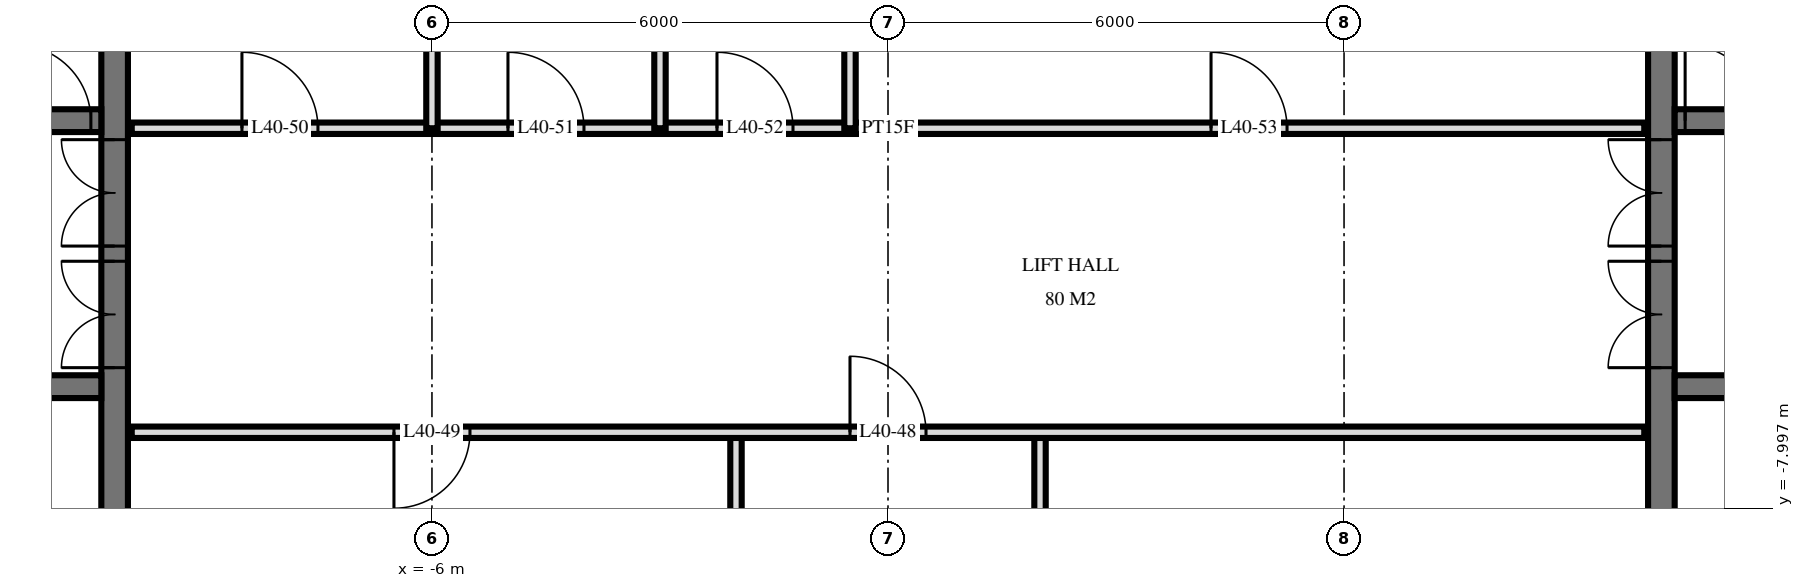
"""IFC4 building model, lengths in metres.
Left out: names, types, materials, properties, quantities, classifications, styles, units other than length and angle.
Written with IfcOpenShell. Run it as: python <this file> out.ifc"""

import sys

from ifc_helpers import new_model, si_unit, direction, frame, frame_2d, origin, place, context, subcontext, project, spatial, rectangle, extrude, element, fill, save


model = new_model("IFC4")
c1 = context("Model", 3, precision=1e-05, world=origin(), true_north=direction((0.0, 1.0)))
c2 = subcontext(c1, "Body", "Model", "MODEL_VIEW")
j1 = project(units=[si_unit("LENGTHUNIT", "METRE"), si_unit("PLANEANGLEUNIT", "RADIAN")], contexts=[c1])
p1 = place(None, origin())
s1 = spatial("IfcSite", under=j1, at=p1, CompositionType="ELEMENT")
p2 = place(p1, origin())
s2 = spatial("IfcBuilding", under=s1, at=p2, CompositionType="ELEMENT")
p3 = place(p2, frame((0.0, 0.0, 156.0)))
s3 = spatial("IfcBuildingStorey", under=s2, at=p3, CompositionType="ELEMENT", Elevation=156.0)
p4 = place(p3, frame((-10.175, -14.55, 0.0), z_axis=(0.0, 0.0, 1.0), x_axis=(0.0, 1.0, 0.0)))
e1 = element("IfcWall", 1, at=p4, inside=s3, PredefinedType="SHEAR", context=c2, shape_type="SweptSolid", body=[
    extrude(rectangle(XDim=14.1, YDim=0.35, at=frame_2d((7.05, 0.0))), origin(), (0.0, 0.0, 1.0), 3.6),
])
p5 = place(p4, frame((8.4, 0.0, 0.0)))
e2 = element("IfcOpeningElement", 2, at=p5, cuts=e1, PredefinedType="OPENING", context=c2, shape_type="SweptSolid", body=[
    extrude(rectangle(XDim=1.4, YDim=2.4, at=frame_2d((0.7, 1.2))), frame((0.0, 0.185, 0.0), z_axis=(0.0, -1.0, 0.0), x_axis=(1.0, 0.0, 0.0)), (0.0, 0.0, 1.0), 0.37),
])
p6 = place(p4, frame((10.0, 0.0, 0.0)))
e3 = element("IfcOpeningElement", 3, at=p6, cuts=e1, PredefinedType="OPENING", context=c2, shape_type="SweptSolid", body=[
    extrude(rectangle(XDim=1.4, YDim=2.4, at=frame_2d((0.7, 1.2))), frame((0.0, 0.185, 0.0), z_axis=(0.0, -1.0, 0.0), x_axis=(1.0, 0.0, 0.0)), (0.0, 0.0, 1.0), 0.37),
])
p7 = place(p4, frame((4.0, 0.0, 0.0)))
e4 = element("IfcOpeningElement", 4, at=p7, cuts=e1, PredefinedType="OPENING", context=c2, shape_type="SweptSolid", body=[
    extrude(rectangle(XDim=1.2, YDim=2.1, at=frame_2d((0.6, 1.05))), frame((0.0, 0.185, 0.0), z_axis=(0.0, -1.0, 0.0), x_axis=(1.0, 0.0, 0.0)), (0.0, 0.0, 1.0), 0.37),
])
p8 = place(p3, frame((-24.05, -2.9, 0.0), z_axis=(0.0, 0.0, 1.0), x_axis=(1.0, 0.0, 0.0)))
e5 = element("IfcWall", 5, at=p8, inside=s3, PredefinedType="SHEAR", context=c2, shape_type="SweptSolid", body=[
    extrude(rectangle(XDim=13.7, YDim=0.3, at=frame_2d((6.85, 0.0))), origin(), (0.0, 0.0, 1.0), 3.6),
])
p9 = place(p8, frame((0.55, 0.0, 0.0)))
e6 = element("IfcOpeningElement", 6, at=p9, cuts=e5, PredefinedType="OPENING", context=c2, shape_type="SweptSolid", body=[
    extrude(rectangle(XDim=1.1, YDim=2.1, at=frame_2d((0.55, 1.05))), frame((0.0, 0.16, 0.0), z_axis=(0.0, -1.0, 0.0), x_axis=(1.0, 0.0, 0.0)), (0.0, 0.0, 1.0), 0.32),
])
p10 = place(p8, frame((6.613, 0.0, 0.0)))
e7 = element("IfcOpeningElement", 7, at=p10, cuts=e5, PredefinedType="OPENING", context=c2, shape_type="SweptSolid", body=[
    extrude(rectangle(XDim=0.9, YDim=2.1, at=frame_2d((0.45, 1.05))), frame((0.0, 0.16, 0.0), z_axis=(0.0, -1.0, 0.0), x_axis=(1.0, 0.0, 0.0)), (0.0, 0.0, 1.0), 0.32),
])
p11 = place(p8, frame((5.188, 0.0, 0.0)))
e8 = element("IfcOpeningElement", 8, at=p11, cuts=e5, PredefinedType="OPENING", context=c2, shape_type="SweptSolid", body=[
    extrude(rectangle(XDim=0.9, YDim=2.1, at=frame_2d((0.45, 1.05))), frame((0.0, 0.16, 0.0), z_axis=(0.0, -1.0, 0.0), x_axis=(1.0, 0.0, 0.0)), (0.0, 0.0, 1.0), 0.32),
])
p12 = place(p8, frame((12.562, 0.0, 0.0)))
e9 = element("IfcOpeningElement", 9, at=p12, cuts=e5, PredefinedType="OPENING", context=c2, shape_type="SweptSolid", body=[
    extrude(rectangle(XDim=1.0, YDim=2.1, at=frame_2d((0.5, 1.05))), frame((0.0, 0.16, 0.0), z_axis=(0.0, -1.0, 0.0), x_axis=(1.0, 0.0, 0.0)), (0.0, 0.0, 1.0), 0.32),
])
p13 = place(p8, frame((11.137, 0.0, 0.0)))
e10 = element("IfcOpeningElement", 10, at=p13, cuts=e5, PredefinedType="OPENING", context=c2, shape_type="SweptSolid", body=[
    extrude(rectangle(XDim=1.0, YDim=2.1, at=frame_2d((0.5, 1.05))), frame((0.0, 0.16, 0.0), z_axis=(0.0, -1.0, 0.0), x_axis=(1.0, 0.0, 0.0)), (0.0, 0.0, 1.0), 0.32),
])
p14 = place(p8, frame((8.85, 0.0, 0.0)))
e11 = element("IfcOpeningElement", 11, at=p14, cuts=e5, PredefinedType="OPENING", context=c2, shape_type="SweptSolid", body=[
    extrude(rectangle(XDim=1.0, YDim=2.1, at=frame_2d((0.5, 1.05))), frame((0.0, 0.16, 0.0), z_axis=(0.0, -1.0, 0.0), x_axis=(1.0, 0.0, 0.0)), (0.0, 0.0, 1.0), 0.32),
])
p15 = place(p8, frame((3.0, 0.0, 0.0)))
e12 = element("IfcOpeningElement", 12, at=p15, cuts=e5, PredefinedType="OPENING", context=c2, shape_type="SweptSolid", body=[
    extrude(rectangle(XDim=1.0, YDim=2.1, at=frame_2d((0.5, 1.05))), frame((0.0, 0.16, 0.0), z_axis=(0.0, -1.0, 0.0), x_axis=(1.0, 0.0, 0.0)), (0.0, 0.0, 1.0), 0.32),
])
p16 = place(p3, frame((-24.05, -6.4, 0.0), z_axis=(0.0, 0.0, 1.0), x_axis=(1.0, 0.0, 0.0)))
e13 = element("IfcWall", 13, at=p16, inside=s3, PredefinedType="SHEAR", context=c2, shape_type="SweptSolid", body=[
    extrude(rectangle(XDim=13.7, YDim=0.3, at=frame_2d((6.85, 0.0))), origin(), (0.0, 0.0, 1.0), 3.6),
])
p17 = place(p16, frame((0.55, 0.0, 0.0)))
e14 = element("IfcOpeningElement", 14, at=p17, cuts=e13, PredefinedType="OPENING", context=c2, shape_type="SweptSolid", body=[
    extrude(rectangle(XDim=1.1, YDim=2.1, at=frame_2d((0.55, 1.05))), frame((0.0, 0.16, 0.0), z_axis=(0.0, -1.0, 0.0), x_axis=(1.0, 0.0, 0.0)), (0.0, 0.0, 1.0), 0.32),
])
p18 = place(p16, frame((5.8, 0.0, 0.0)))
e15 = element("IfcOpeningElement", 15, at=p18, cuts=e13, PredefinedType="OPENING", context=c2, shape_type="SweptSolid", body=[
    extrude(rectangle(XDim=1.1, YDim=2.1, at=frame_2d((0.55, 1.05))), frame((0.0, 0.16, 0.0), z_axis=(0.0, -1.0, 0.0), x_axis=(1.0, 0.0, 0.0)), (0.0, 0.0, 1.0), 0.32),
])
p19 = place(p3, frame((10.175, -14.55, 0.0), z_axis=(0.0, 0.0, 1.0), x_axis=(0.0, 1.0, 0.0)))
e16 = element("IfcWall", 16, at=p19, inside=s3, PredefinedType="SHEAR", context=c2, shape_type="SweptSolid", body=[
    extrude(rectangle(XDim=14.1, YDim=0.35, at=frame_2d((7.05, 0.0))), origin(), (0.0, 0.0, 1.0), 3.6),
])
p20 = place(p19, frame((8.4, 0.0, 0.0)))
e17 = element("IfcOpeningElement", 17, at=p20, cuts=e16, PredefinedType="OPENING", context=c2, shape_type="SweptSolid", body=[
    extrude(rectangle(XDim=1.4, YDim=2.4, at=frame_2d((0.7, 1.2))), frame((0.0, 0.185, 0.0), z_axis=(0.0, -1.0, 0.0), x_axis=(1.0, 0.0, 0.0)), (0.0, 0.0, 1.0), 0.37),
])
p21 = place(p19, frame((10.0, 0.0, 0.0)))
e18 = element("IfcOpeningElement", 18, at=p21, cuts=e16, PredefinedType="OPENING", context=c2, shape_type="SweptSolid", body=[
    extrude(rectangle(XDim=1.4, YDim=2.4, at=frame_2d((0.7, 1.2))), frame((0.0, 0.185, 0.0), z_axis=(0.0, -1.0, 0.0), x_axis=(1.0, 0.0, 0.0)), (0.0, 0.0, 1.0), 0.37),
])
p22 = place(p19, frame((4.0, 0.0, 0.0)))
e19 = element("IfcOpeningElement", 19, at=p22, cuts=e16, PredefinedType="OPENING", context=c2, shape_type="SweptSolid", body=[
    extrude(rectangle(XDim=1.2, YDim=2.1, at=frame_2d((0.6, 1.05))), frame((0.0, 0.185, 0.0), z_axis=(0.0, -1.0, 0.0), x_axis=(1.0, 0.0, 0.0)), (0.0, 0.0, 1.0), 0.37),
])
p23 = place(p3, frame((10.35, -2.9, 0.0), z_axis=(0.0, 0.0, 1.0), x_axis=(1.0, 0.0, 0.0)))
e20 = element("IfcWall", 20, at=p23, inside=s3, PredefinedType="SHEAR", context=c2, shape_type="SweptSolid", body=[
    extrude(rectangle(XDim=13.7, YDim=0.3, at=frame_2d((6.85, 0.0))), origin(), (0.0, 0.0, 1.0), 3.6),
])
p24 = place(p23, frame((12.05, 0.0, 0.0)))
e21 = element("IfcOpeningElement", 21, at=p24, cuts=e20, PredefinedType="OPENING", context=c2, shape_type="SweptSolid", body=[
    extrude(rectangle(XDim=1.1, YDim=2.1, at=frame_2d((0.55, 1.05))), frame((0.0, 0.16, 0.0), z_axis=(0.0, -1.0, 0.0), x_axis=(1.0, 0.0, 0.0)), (0.0, 0.0, 1.0), 0.32),
])
p25 = place(p23, frame((6.188, 0.0, 0.0)))
e22 = element("IfcOpeningElement", 22, at=p25, cuts=e20, PredefinedType="OPENING", context=c2, shape_type="SweptSolid", body=[
    extrude(rectangle(XDim=0.9, YDim=2.1, at=frame_2d((0.45, 1.05))), frame((0.0, 0.16, 0.0), z_axis=(0.0, -1.0, 0.0), x_axis=(1.0, 0.0, 0.0)), (0.0, 0.0, 1.0), 0.32),
])
p26 = place(p23, frame((7.613, 0.0, 0.0)))
e23 = element("IfcOpeningElement", 23, at=p26, cuts=e20, PredefinedType="OPENING", context=c2, shape_type="SweptSolid", body=[
    extrude(rectangle(XDim=0.9, YDim=2.1, at=frame_2d((0.45, 1.05))), frame((0.0, 0.16, 0.0), z_axis=(0.0, -1.0, 0.0), x_axis=(1.0, 0.0, 0.0)), (0.0, 0.0, 1.0), 0.32),
])
p27 = place(p23, frame((0.137, 0.0, 0.0)))
e24 = element("IfcOpeningElement", 24, at=p27, cuts=e20, PredefinedType="OPENING", context=c2, shape_type="SweptSolid", body=[
    extrude(rectangle(XDim=1.0, YDim=2.1, at=frame_2d((0.5, 1.05))), frame((0.0, 0.16, 0.0), z_axis=(0.0, -1.0, 0.0), x_axis=(1.0, 0.0, 0.0)), (0.0, 0.0, 1.0), 0.32),
])
p28 = place(p23, frame((1.562, 0.0, 0.0)))
e25 = element("IfcOpeningElement", 25, at=p28, cuts=e20, PredefinedType="OPENING", context=c2, shape_type="SweptSolid", body=[
    extrude(rectangle(XDim=1.0, YDim=2.1, at=frame_2d((0.5, 1.05))), frame((0.0, 0.16, 0.0), z_axis=(0.0, -1.0, 0.0), x_axis=(1.0, 0.0, 0.0)), (0.0, 0.0, 1.0), 0.32),
])
p29 = place(p23, frame((3.85, 0.0, 0.0)))
e26 = element("IfcOpeningElement", 26, at=p29, cuts=e20, PredefinedType="OPENING", context=c2, shape_type="SweptSolid", body=[
    extrude(rectangle(XDim=1.0, YDim=2.1, at=frame_2d((0.5, 1.05))), frame((0.0, 0.16, 0.0), z_axis=(0.0, -1.0, 0.0), x_axis=(1.0, 0.0, 0.0)), (0.0, 0.0, 1.0), 0.32),
])
p30 = place(p23, frame((9.7, 0.0, 0.0)))
e27 = element("IfcOpeningElement", 27, at=p30, cuts=e20, PredefinedType="OPENING", context=c2, shape_type="SweptSolid", body=[
    extrude(rectangle(XDim=1.0, YDim=2.1, at=frame_2d((0.5, 1.05))), frame((0.0, 0.16, 0.0), z_axis=(0.0, -1.0, 0.0), x_axis=(1.0, 0.0, 0.0)), (0.0, 0.0, 1.0), 0.32),
])
p31 = place(p3, frame((10.35, -6.4, 0.0), z_axis=(0.0, 0.0, 1.0), x_axis=(1.0, 0.0, 0.0)))
e28 = element("IfcWall", 28, at=p31, inside=s3, PredefinedType="SHEAR", context=c2, shape_type="SweptSolid", body=[
    extrude(rectangle(XDim=13.7, YDim=0.3, at=frame_2d((6.85, 0.0))), origin(), (0.0, 0.0, 1.0), 3.6),
])
p32 = place(p31, frame((12.05, 0.0, 0.0)))
e29 = element("IfcOpeningElement", 29, at=p32, cuts=e28, PredefinedType="OPENING", context=c2, shape_type="SweptSolid", body=[
    extrude(rectangle(XDim=1.1, YDim=2.1, at=frame_2d((0.55, 1.05))), frame((0.0, 0.16, 0.0), z_axis=(0.0, -1.0, 0.0), x_axis=(1.0, 0.0, 0.0)), (0.0, 0.0, 1.0), 0.32),
])
p33 = place(p31, frame((6.8, 0.0, 0.0)))
e30 = element("IfcOpeningElement", 30, at=p33, cuts=e28, PredefinedType="OPENING", context=c2, shape_type="SweptSolid", body=[
    extrude(rectangle(XDim=1.1, YDim=2.1, at=frame_2d((0.55, 1.05))), frame((0.0, 0.16, 0.0), z_axis=(0.0, -1.0, 0.0), x_axis=(1.0, 0.0, 0.0)), (0.0, 0.0, 1.0), 0.32),
])
p34 = place(p3, frame((2.0, -11.0, 0.0), z_axis=(0.0, 0.0, 1.0), x_axis=(0.0, 1.0, 0.0)))
e31 = element("IfcWall", 31, at=p34, inside=s3, PredefinedType="PARTITIONING", context=c2, shape_type="SweptSolid", body=[
    extrude(rectangle(XDim=4.0, YDim=0.15, at=frame_2d((2.0, 0.0))), origin(), (0.0, 0.0, 1.0), 3.32),
])
p35 = place(p3, frame((-0.5, -3.0, 0.0), z_axis=(0.0, 0.0, 1.0), x_axis=(0.0, 1.0, 0.0)))
e32 = element("IfcWall", 32, at=p35, inside=s3, PredefinedType="PLUMBINGWALL", context=c2, shape_type="SweptSolid", body=[
    extrude(rectangle(XDim=4.02, YDim=0.15, at=frame_2d((2.01, 0.0))), origin(), (0.0, 0.0, 1.0), 3.32),
])
p36 = place(p3, frame((-2.0, -11.0, 0.0), z_axis=(0.0, 0.0, 1.0), x_axis=(0.0, 1.0, 0.0)))
e33 = element("IfcWall", 33, at=p36, inside=s3, PredefinedType="PARTITIONING", context=c2, shape_type="SweptSolid", body=[
    extrude(rectangle(XDim=4.0, YDim=0.15, at=frame_2d((2.0, 0.0))), origin(), (0.0, 0.0, 1.0), 3.32),
])
for number, where, z_axis, x_axis in (
    (34, (-3.0, -3.0, 0.0), (0.0, 0.0, 1.0), (0.0, 1.0, 0.0)),
    (35, (-6.0, -3.0, 0.0), (0.0, 0.0, 1.0), (0.0, 1.0, 0.0)),
):
    element("IfcWall", number, at=place(p3, frame(where, z_axis=z_axis, x_axis=x_axis)), inside=s3, PredefinedType="PLUMBINGWALL", context=c2, shape_type="SweptSolid", body=[
        extrude(rectangle(XDim=4.02, YDim=0.15, at=frame_2d((2.01, 0.0))), origin(), (0.0, 0.0, 1.0), 3.32),
    ])
p37 = place(p3, frame((-9.95, -7.0, 0.0), z_axis=(0.0, 0.0, 1.0), x_axis=(1.0, 0.0, 0.0)))
e36 = element("IfcWall", 36, at=p37, inside=s3, PredefinedType="PARTITIONING", context=c2, shape_type="SweptSolid", body=[
    extrude(rectangle(XDim=19.9, YDim=0.15, at=frame_2d((9.95, 0.0))), origin(), (0.0, 0.0, 1.0), 3.32),
])
p38 = place(p37, frame((9.45, 0.0, 0.0)))
e37 = element("IfcOpeningElement", 37, at=p38, cuts=e36, PredefinedType="OPENING", context=c2, shape_type="SweptSolid", body=[
    extrude(rectangle(XDim=1.0, YDim=2.1, at=frame_2d((0.5, 1.05))), frame((0.0, 0.085, 0.0), z_axis=(0.0, -1.0, 0.0), x_axis=(1.0, 0.0, 0.0)), (0.0, 0.0, 1.0), 0.17),
])
p39 = place(p37, frame((3.45, 0.0, 0.0)))
e38 = element("IfcOpeningElement", 38, at=p39, cuts=e36, PredefinedType="OPENING", context=c2, shape_type="SweptSolid", body=[
    extrude(rectangle(XDim=1.0, YDim=2.1, at=frame_2d((0.5, 1.05))), frame((0.0, 0.085, 0.0), z_axis=(0.0, -1.0, 0.0), x_axis=(1.0, 0.0, 0.0)), (0.0, 0.0, 1.0), 0.17),
])
p40 = place(p3, frame((-9.95, -3.0, 0.0), z_axis=(0.0, 0.0, 1.0), x_axis=(1.0, 0.0, 0.0)))
e39 = element("IfcWall", 39, at=p40, inside=s3, PredefinedType="PARTITIONING", context=c2, shape_type="SweptSolid", body=[
    extrude(rectangle(XDim=19.9, YDim=0.15, at=frame_2d((9.95, 0.0))), origin(), (0.0, 0.0, 1.0), 3.32),
])
p41 = place(p40, frame((1.45, 0.0, 0.0)))
e40 = element("IfcOpeningElement", 40, at=p41, cuts=e39, PredefinedType="OPENING", context=c2, shape_type="SweptSolid", body=[
    extrude(rectangle(XDim=1.0, YDim=2.1, at=frame_2d((0.5, 1.05))), frame((0.0, 0.085, 0.0), z_axis=(0.0, -1.0, 0.0), x_axis=(1.0, 0.0, 0.0)), (0.0, 0.0, 1.0), 0.17),
])
p42 = place(p40, frame((4.95, 0.0, 0.0)))
e41 = element("IfcOpeningElement", 41, at=p42, cuts=e39, PredefinedType="OPENING", context=c2, shape_type="SweptSolid", body=[
    extrude(rectangle(XDim=1.0, YDim=2.1, at=frame_2d((0.5, 1.05))), frame((0.0, 0.085, 0.0), z_axis=(0.0, -1.0, 0.0), x_axis=(1.0, 0.0, 0.0)), (0.0, 0.0, 1.0), 0.17),
])
p43 = place(p40, frame((7.7, 0.0, 0.0)))
e42 = element("IfcOpeningElement", 42, at=p43, cuts=e39, PredefinedType="OPENING", context=c2, shape_type="SweptSolid", body=[
    extrude(rectangle(XDim=1.0, YDim=2.1, at=frame_2d((0.5, 1.05))), frame((0.0, 0.085, 0.0), z_axis=(0.0, -1.0, 0.0), x_axis=(1.0, 0.0, 0.0)), (0.0, 0.0, 1.0), 0.17),
])
p44 = place(p40, frame((14.2, 0.0, 0.0)))
e43 = element("IfcOpeningElement", 43, at=p44, cuts=e39, PredefinedType="OPENING", context=c2, shape_type="SweptSolid", body=[
    extrude(rectangle(XDim=1.0, YDim=2.1, at=frame_2d((0.5, 1.05))), frame((0.0, 0.085, 0.0), z_axis=(0.0, -1.0, 0.0), x_axis=(1.0, 0.0, 0.0)), (0.0, 0.0, 1.0), 0.17),
])
p45 = place(p5, origin())
e44 = element("IfcDoor", 44, at=p45, inside=s3, OperationType="DOUBLE_DOOR_SINGLE_SWING", PredefinedType="DOOR", context=c2, shape_type="SweptSolid", body=[
    extrude(rectangle(XDim=1.4, YDim=2.4, at=frame_2d((0.7, 1.2))), frame((0.0, 0.025, 0.0), z_axis=(0.0, -1.0, 0.0), x_axis=(1.0, 0.0, 0.0)), (0.0, 0.0, 1.0), 0.05),
])
fill(e2, e44)
p46 = place(p6, origin())
e45 = element("IfcDoor", 45, at=p46, inside=s3, OperationType="DOUBLE_DOOR_SINGLE_SWING", PredefinedType="DOOR", context=c2, shape_type="SweptSolid", body=[
    extrude(rectangle(XDim=1.4, YDim=2.4, at=frame_2d((0.7, 1.2))), frame((0.0, 0.025, 0.0), z_axis=(0.0, -1.0, 0.0), x_axis=(1.0, 0.0, 0.0)), (0.0, 0.0, 1.0), 0.05),
])
fill(e3, e45)
p47 = place(p12, origin())
e46 = element("IfcDoor", 46, at=p47, inside=s3, OperationType="SINGLE_SWING_RIGHT", PredefinedType="DOOR", context=c2, shape_type="SweptSolid", body=[
    extrude(rectangle(XDim=1.0, YDim=2.1, at=frame_2d((0.5, 1.05))), frame((0.0, 0.025, 0.0), z_axis=(0.0, -1.0, 0.0), x_axis=(1.0, 0.0, 0.0)), (0.0, 0.0, 1.0), 0.05),
])
fill(e9, e46)
p48 = place(p20, origin())
e47 = element("IfcDoor", 47, at=p48, inside=s3, OperationType="DOUBLE_DOOR_SINGLE_SWING", PredefinedType="DOOR", context=c2, shape_type="SweptSolid", body=[
    extrude(rectangle(XDim=1.4, YDim=2.4, at=frame_2d((0.7, 1.2))), frame((0.0, 0.025, 0.0), z_axis=(0.0, -1.0, 0.0), x_axis=(1.0, 0.0, 0.0)), (0.0, 0.0, 1.0), 0.05),
])
fill(e17, e47)
p49 = place(p21, origin())
e48 = element("IfcDoor", 48, at=p49, inside=s3, OperationType="DOUBLE_DOOR_SINGLE_SWING", PredefinedType="DOOR", context=c2, shape_type="SweptSolid", body=[
    extrude(rectangle(XDim=1.4, YDim=2.4, at=frame_2d((0.7, 1.2))), frame((0.0, 0.025, 0.0), z_axis=(0.0, -1.0, 0.0), x_axis=(1.0, 0.0, 0.0)), (0.0, 0.0, 1.0), 0.05),
])
fill(e18, e48)
p50 = place(p27, origin())
e49 = element("IfcDoor", 49, at=p50, inside=s3, OperationType="SINGLE_SWING_RIGHT", PredefinedType="DOOR", context=c2, shape_type="SweptSolid", body=[
    extrude(rectangle(XDim=1.0, YDim=2.1, at=frame_2d((0.5, 1.05))), frame((0.0, 0.025, 0.0), z_axis=(0.0, -1.0, 0.0), x_axis=(1.0, 0.0, 0.0)), (0.0, 0.0, 1.0), 0.05),
])
fill(e24, e49)
p51 = place(p38, origin())
e50 = element("IfcDoor", 50, at=p51, inside=s3, OperationType="SINGLE_SWING_RIGHT", PredefinedType="DOOR", context=c2, shape_type="SweptSolid", body=[
    extrude(rectangle(XDim=1.0, YDim=2.1, at=frame_2d((0.5, 1.05))), frame((0.0, 0.025, 0.0), z_axis=(0.0, -1.0, 0.0), x_axis=(1.0, 0.0, 0.0)), (0.0, 0.0, 1.0), 0.05),
])
fill(e37, e50)
p52 = place(p39, frame((0.5, 0.0, 0.0), z_axis=(0.0, 0.0, 1.0), x_axis=(-1.0, 0.0, 0.0)))
e51 = element("IfcDoor", 51, at=p52, inside=s3, OperationType="SINGLE_SWING_LEFT", PredefinedType="DOOR", context=c2, shape_type="SweptSolid", body=[
    extrude(rectangle(XDim=1.0, YDim=2.1, at=frame_2d((0.0, 1.05))), frame((0.0, -0.025, 0.0), z_axis=(0.0, 1.0, 0.0), x_axis=(-1.0, 0.0, 0.0)), (0.0, 0.0, 1.0), 0.05),
])
fill(e38, e51)
p53 = place(p41, origin())
e52 = element("IfcDoor", 52, at=p53, inside=s3, OperationType="SINGLE_SWING_RIGHT", PredefinedType="DOOR", context=c2, shape_type="SweptSolid", body=[
    extrude(rectangle(XDim=1.0, YDim=2.1, at=frame_2d((0.5, 1.05))), frame((0.0, 0.025, 0.0), z_axis=(0.0, -1.0, 0.0), x_axis=(1.0, 0.0, 0.0)), (0.0, 0.0, 1.0), 0.05),
])
fill(e40, e52)
p54 = place(p42, origin())
e53 = element("IfcDoor", 53, at=p54, inside=s3, OperationType="SINGLE_SWING_RIGHT", PredefinedType="DOOR", context=c2, shape_type="SweptSolid", body=[
    extrude(rectangle(XDim=1.0, YDim=2.1, at=frame_2d((0.5, 1.05))), frame((0.0, 0.025, 0.0), z_axis=(0.0, -1.0, 0.0), x_axis=(1.0, 0.0, 0.0)), (0.0, 0.0, 1.0), 0.05),
])
fill(e41, e53)
p55 = place(p43, origin())
e54 = element("IfcDoor", 54, at=p55, inside=s3, OperationType="SINGLE_SWING_RIGHT", PredefinedType="DOOR", context=c2, shape_type="SweptSolid", body=[
    extrude(rectangle(XDim=1.0, YDim=2.1, at=frame_2d((0.5, 1.05))), frame((0.0, 0.025, 0.0), z_axis=(0.0, -1.0, 0.0), x_axis=(1.0, 0.0, 0.0)), (0.0, 0.0, 1.0), 0.05),
])
fill(e42, e54)
p56 = place(p44, origin())
e55 = element("IfcDoor", 55, at=p56, inside=s3, OperationType="SINGLE_SWING_RIGHT", PredefinedType="DOOR", context=c2, shape_type="SweptSolid", body=[
    extrude(rectangle(XDim=1.0, YDim=2.1, at=frame_2d((0.5, 1.05))), frame((0.0, 0.025, 0.0), z_axis=(0.0, -1.0, 0.0), x_axis=(1.0, 0.0, 0.0)), (0.0, 0.0, 1.0), 0.05),
])
fill(e43, e55)
save(model, sys.argv[1])
